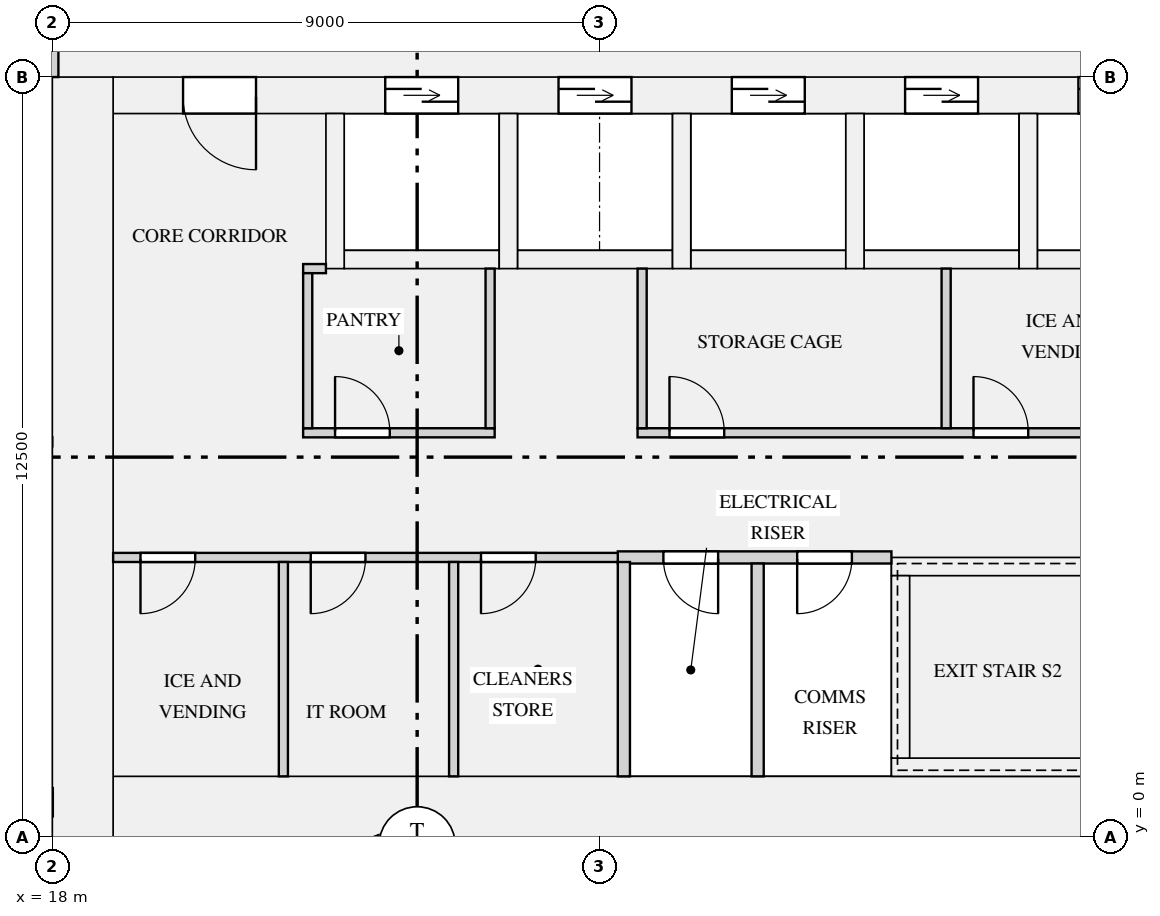
"""IFC4 building model, lengths in metres.
Left out: names, types, materials, properties, quantities, classifications, styles, units other than length and angle.
Written with IfcOpenShell. Run it as: python <this file> out.ifc"""

import sys

from ifc_helpers import new_model, si_unit, direction, frame, frame_2d, origin, place, context, subcontext, project, spatial, rectangle, extrude, element, fill, save


model = new_model("IFC4")
c1 = context("Model", 3, precision=1e-05, world=origin(), true_north=direction((0.0, 1.0)))
c2 = subcontext(c1, "Body", "Model", "MODEL_VIEW")
j1 = project(units=[si_unit("LENGTHUNIT", "METRE"), si_unit("PLANEANGLEUNIT", "RADIAN")], contexts=[c1])
p1 = place(None, origin())
s1 = spatial("IfcSite", under=j1, at=p1, CompositionType="ELEMENT")
p2 = place(p1, origin())
s2 = spatial("IfcBuilding", under=s1, at=p2, CompositionType="ELEMENT")
p3 = place(p2, frame((0.0, 0.0, 54.15)))
s3 = spatial("IfcBuildingStorey", under=s2, at=p3, CompositionType="ELEMENT", Elevation=54.15)
p4 = place(p3, frame((18.5, 0.0, 0.0), z_axis=(0.0, 0.0, 1.0), x_axis=(0.0, 1.0, 0.0)))
e1 = element("IfcWall", 1, at=p4, inside=s3, PredefinedType="SHEAR", context=c2, shape_type="SweptSolid", body=[
    extrude(rectangle(XDim=12.5, YDim=1.0, at=frame_2d((6.25, 0.0))), origin(), (0.0, 0.0, 1.0), 3.15),
])
p5 = place(p3, frame((19.0, 0.5, 0.0), z_axis=(0.0, 0.0, 1.0), x_axis=(1.0, 0.0, 0.0)))
e2 = element("IfcWall", 2, at=p5, inside=s3, PredefinedType="SHEAR", context=c2, shape_type="SweptSolid", body=[
    extrude(rectangle(XDim=34.0, YDim=1.0, at=frame_2d((17.0, 0.0))), origin(), (0.0, 0.0, 1.0), 3.15),
])
p6 = place(p3, frame((19.0, 12.2, 0.0), z_axis=(0.0, 0.0, 1.0), x_axis=(1.0, 0.0, 0.0)))
e3 = element("IfcWall", 3, at=p6, inside=s3, PredefinedType="SHEAR", context=c2, shape_type="SweptSolid", body=[
    extrude(rectangle(XDim=34.0, YDim=0.6, at=frame_2d((17.0, 0.0))), origin(), (0.0, 0.0, 1.0), 3.15),
])
p7 = place(p6, frame((4.475, 0.0, 0.0)))
e4 = element("IfcOpeningElement", 4, at=p7, cuts=e3, PredefinedType="OPENING", context=c2, shape_type="SweptSolid", body=[
    extrude(rectangle(XDim=1.2, YDim=2.1, at=frame_2d((0.6, 1.05))), frame((0.0, 0.31, 0.0), z_axis=(0.0, -1.0, 0.0), x_axis=(1.0, 0.0, 0.0)), (0.0, 0.0, 1.0), 0.62),
])
p8 = place(p6, frame((7.325, 0.0, 0.0)))
e5 = element("IfcOpeningElement", 5, at=p8, cuts=e3, PredefinedType="OPENING", context=c2, shape_type="SweptSolid", body=[
    extrude(rectangle(XDim=1.2, YDim=2.1, at=frame_2d((0.6, 1.05))), frame((0.0, 0.31, 0.0), z_axis=(0.0, -1.0, 0.0), x_axis=(1.0, 0.0, 0.0)), (0.0, 0.0, 1.0), 0.62),
])
p9 = place(p6, frame((10.175, 0.0, 0.0)))
e6 = element("IfcOpeningElement", 6, at=p9, cuts=e3, PredefinedType="OPENING", context=c2, shape_type="SweptSolid", body=[
    extrude(rectangle(XDim=1.2, YDim=2.1, at=frame_2d((0.6, 1.05))), frame((0.0, 0.31, 0.0), z_axis=(0.0, -1.0, 0.0), x_axis=(1.0, 0.0, 0.0)), (0.0, 0.0, 1.0), 0.62),
])
p10 = place(p6, frame((13.025, 0.0, 0.0)))
e7 = element("IfcOpeningElement", 7, at=p10, cuts=e3, PredefinedType="OPENING", context=c2, shape_type="SweptSolid", body=[
    extrude(rectangle(XDim=1.2, YDim=2.1, at=frame_2d((0.6, 1.05))), frame((0.0, 0.31, 0.0), z_axis=(0.0, -1.0, 0.0), x_axis=(1.0, 0.0, 0.0)), (0.0, 0.0, 1.0), 0.62),
])
p11 = place(p6, frame((15.875, 0.0, 0.0)))
e8 = element("IfcOpeningElement", 8, at=p11, cuts=e3, PredefinedType="OPENING", context=c2, shape_type="SweptSolid", body=[
    extrude(rectangle(XDim=1.2, YDim=2.1, at=frame_2d((0.6, 1.05))), frame((0.0, 0.31, 0.0), z_axis=(0.0, -1.0, 0.0), x_axis=(1.0, 0.0, 0.0)), (0.0, 0.0, 1.0), 0.62),
])
p12 = place(p6, frame((24.175, 0.0, 0.0)))
e9 = element("IfcOpeningElement", 9, at=p12, cuts=e3, PredefinedType="OPENING", context=c2, shape_type="SweptSolid", body=[
    extrude(rectangle(XDim=1.1, YDim=2.1, at=frame_2d((0.55, 1.05))), frame((0.0, 0.31, 0.0), z_axis=(0.0, -1.0, 0.0), x_axis=(1.0, 0.0, 0.0)), (0.0, 0.0, 1.0), 0.62),
])
p13 = place(p6, frame((26.425, 0.0, 0.0)))
e10 = element("IfcOpeningElement", 10, at=p13, cuts=e3, PredefinedType="OPENING", context=c2, shape_type="SweptSolid", body=[
    extrude(rectangle(XDim=1.1, YDim=2.1, at=frame_2d((0.55, 1.05))), frame((0.0, 0.31, 0.0), z_axis=(0.0, -1.0, 0.0), x_axis=(1.0, 0.0, 0.0)), (0.0, 0.0, 1.0), 0.62),
])
p14 = place(p6, frame((28.675, 0.0, 0.0)))
e11 = element("IfcOpeningElement", 11, at=p14, cuts=e3, PredefinedType="OPENING", context=c2, shape_type="SweptSolid", body=[
    extrude(rectangle(XDim=1.1, YDim=2.1, at=frame_2d((0.55, 1.05))), frame((0.0, 0.31, 0.0), z_axis=(0.0, -1.0, 0.0), x_axis=(1.0, 0.0, 0.0)), (0.0, 0.0, 1.0), 0.62),
])
p15 = place(p6, frame((1.15, 0.0, 0.0)))
e12 = element("IfcOpeningElement", 12, at=p15, cuts=e3, PredefinedType="OPENING", context=c2, shape_type="SweptSolid", body=[
    extrude(rectangle(XDim=1.2, YDim=2.1, at=frame_2d((0.6, 1.05))), frame((0.0, 0.31, 0.0), z_axis=(0.0, -1.0, 0.0), x_axis=(1.0, 0.0, 0.0)), (0.0, 0.0, 1.0), 0.62),
])
p16 = place(p6, frame((31.65, 0.0, 0.0)))
e13 = element("IfcOpeningElement", 13, at=p16, cuts=e3, PredefinedType="OPENING", context=c2, shape_type="SweptSolid", body=[
    extrude(rectangle(XDim=1.2, YDim=2.1, at=frame_2d((0.6, 1.05))), frame((0.0, 0.31, 0.0), z_axis=(0.0, -1.0, 0.0), x_axis=(1.0, 0.0, 0.0)), (0.0, 0.0, 1.0), 0.62),
])
p17 = place(p3, frame((22.8, 9.5, 0.0), z_axis=(0.0, 0.0, 1.0), x_axis=(1.0, 0.0, 0.0)))
e14 = element("IfcWall", 14, at=p17, inside=s3, PredefinedType="SHEAR", context=c2, shape_type="SweptSolid", body=[
    extrude(rectangle(XDim=2.55, YDim=0.3, at=frame_2d((1.275, 0.0))), origin(), (0.0, 0.0, 1.0), 3.15),
])
p18 = place(p3, frame((22.65, 9.35, 0.0), z_axis=(0.0, 0.0, 1.0), x_axis=(0.0, 1.0, 0.0)))
e15 = element("IfcWall", 15, at=p18, inside=s3, PredefinedType="SHEAR", context=c2, shape_type="SweptSolid", body=[
    extrude(rectangle(XDim=2.55, YDim=0.3, at=frame_2d((1.275, 0.0))), origin(), (0.0, 0.0, 1.0), 3.15),
])
p19 = place(p3, frame((25.65, 9.5, 0.0), z_axis=(0.0, 0.0, 1.0), x_axis=(1.0, 0.0, 0.0)))
e16 = element("IfcWall", 16, at=p19, inside=s3, PredefinedType="SHEAR", context=c2, shape_type="SweptSolid", body=[
    extrude(rectangle(XDim=2.55, YDim=0.3, at=frame_2d((1.275, 0.0))), origin(), (0.0, 0.0, 1.0), 3.15),
])
p20 = place(p3, frame((25.5, 9.35, 0.0), z_axis=(0.0, 0.0, 1.0), x_axis=(0.0, 1.0, 0.0)))
e17 = element("IfcWall", 17, at=p20, inside=s3, PredefinedType="SHEAR", context=c2, shape_type="SweptSolid", body=[
    extrude(rectangle(XDim=2.55, YDim=0.3, at=frame_2d((1.275, 0.0))), origin(), (0.0, 0.0, 1.0), 3.15),
])
p21 = place(p3, frame((28.5, 9.5, 0.0), z_axis=(0.0, 0.0, 1.0), x_axis=(1.0, 0.0, 0.0)))
e18 = element("IfcWall", 18, at=p21, inside=s3, PredefinedType="SHEAR", context=c2, shape_type="SweptSolid", body=[
    extrude(rectangle(XDim=2.55, YDim=0.3, at=frame_2d((1.275, 0.0))), origin(), (0.0, 0.0, 1.0), 3.15),
])
for number, where, z_axis, x_axis in (
    (19, (28.35, 9.35, 0.0), (0.0, 0.0, 1.0), (0.0, 1.0, 0.0)),
    (20, (31.35, 9.5, 0.0), (0.0, 0.0, 1.0), (1.0, 0.0, 0.0)),
    (21, (31.2, 9.35, 0.0), (0.0, 0.0, 1.0), (0.0, 1.0, 0.0)),
):
    element("IfcWall", number, at=place(p3, frame(where, z_axis=z_axis, x_axis=x_axis)), inside=s3, PredefinedType="SHEAR", context=c2, shape_type="SweptSolid", body=[
        extrude(rectangle(XDim=2.55, YDim=0.3, at=frame_2d((1.275, 0.0))), origin(), (0.0, 0.0, 1.0), 3.15),
    ])
p22 = place(p3, frame((34.2, 9.5, 0.0), z_axis=(0.0, 0.0, 1.0), x_axis=(1.0, 0.0, 0.0)))
e22 = element("IfcWall", 22, at=p22, inside=s3, PredefinedType="SHEAR", context=c2, shape_type="SweptSolid", body=[
    extrude(rectangle(XDim=2.55, YDim=0.3, at=frame_2d((1.275, 0.0))), origin(), (0.0, 0.0, 1.0), 3.15),
])
p23 = place(p3, frame((34.05, 9.35, 0.0), z_axis=(0.0, 0.0, 1.0), x_axis=(0.0, 1.0, 0.0)))
e23 = element("IfcWall", 23, at=p23, inside=s3, PredefinedType="SHEAR", context=c2, shape_type="SweptSolid", body=[
    extrude(rectangle(XDim=2.55, YDim=0.3, at=frame_2d((1.275, 0.0))), origin(), (0.0, 0.0, 1.0), 3.15),
])
p24 = place(p3, frame((31.8, 1.15, 0.0), z_axis=(0.0, 0.0, 1.0), x_axis=(1.0, 0.0, 0.0)))
e24 = element("IfcWall", 24, at=p24, inside=s3, PredefinedType="SHEAR", context=c2, shape_type="SweptSolid", body=[
    extrude(rectangle(XDim=8.4, YDim=0.3, at=frame_2d((4.2, 0.0))), origin(), (0.0, 0.0, 1.0), 3.15),
])
p25 = place(p3, frame((31.8, 4.45, 0.0), z_axis=(0.0, 0.0, 1.0), x_axis=(1.0, 0.0, 0.0)))
e25 = element("IfcWall", 25, at=p25, inside=s3, PredefinedType="SHEAR", context=c2, shape_type="SweptSolid", body=[
    extrude(rectangle(XDim=8.4, YDim=0.3, at=frame_2d((4.2, 0.0))), origin(), (0.0, 0.0, 1.0), 3.15),
])
p26 = place(p25, frame((6.8, 0.0, 0.0)))
e26 = element("IfcOpeningElement", 26, at=p26, cuts=e25, PredefinedType="OPENING", context=c2, shape_type="SweptSolid", body=[
    extrude(rectangle(XDim=1.1, YDim=2.1, at=frame_2d((0.55, 1.05))), frame((0.0, 0.16, 0.0), z_axis=(0.0, -1.0, 0.0), x_axis=(1.0, 0.0, 0.0)), (0.0, 0.0, 1.0), 0.32),
])
p27 = place(p3, frame((31.95, 1.3, 0.0), z_axis=(0.0, 0.0, 1.0), x_axis=(0.0, 1.0, 0.0)))
e27 = element("IfcWall", 27, at=p27, inside=s3, PredefinedType="SHEAR", context=c2, shape_type="SweptSolid", body=[
    extrude(rectangle(XDim=3.0, YDim=0.3, at=frame_2d((1.5, 0.0))), origin(), (0.0, 0.0, 1.0), 3.15),
])
p28 = place(p3, frame((27.3, 4.6, 0.0), z_axis=(0.0, 0.0, 1.0), x_axis=(1.0, 0.0, 0.0)))
e28 = element("IfcWall", 28, at=p28, inside=s3, PredefinedType="PARTITIONING", context=c2, shape_type="SweptSolid", body=[
    extrude(rectangle(XDim=4.5, YDim=0.2, at=frame_2d((2.25, 0.0))), origin(), (0.0, 0.0, 1.0), 2.83),
])
p29 = place(p28, frame((0.75, 0.0, 0.0)))
e29 = element("IfcOpeningElement", 29, at=p29, cuts=e28, PredefinedType="OPENING", context=c2, shape_type="SweptSolid", body=[
    extrude(rectangle(XDim=0.9, YDim=2.1, at=frame_2d((0.45, 1.05))), frame((0.0, 0.11, 0.0), z_axis=(0.0, -1.0, 0.0), x_axis=(1.0, 0.0, 0.0)), (0.0, 0.0, 1.0), 0.22),
])
p30 = place(p28, frame((2.95, 0.0, 0.0)))
e30 = element("IfcOpeningElement", 30, at=p30, cuts=e28, PredefinedType="OPENING", context=c2, shape_type="SweptSolid", body=[
    extrude(rectangle(XDim=0.9, YDim=2.1, at=frame_2d((0.45, 1.05))), frame((0.0, 0.11, 0.0), z_axis=(0.0, -1.0, 0.0), x_axis=(1.0, 0.0, 0.0)), (0.0, 0.0, 1.0), 0.22),
])
p31 = place(p3, frame((19.0, 4.6, 0.0), z_axis=(0.0, 0.0, 1.0), x_axis=(1.0, 0.0, 0.0)))
e31 = element("IfcWall", 31, at=p31, inside=s3, PredefinedType="PARTITIONING", context=c2, shape_type="SweptSolid", body=[
    extrude(rectangle(XDim=8.3, YDim=0.15, at=frame_2d((4.15, 0.0))), origin(), (0.0, 0.0, 1.0), 2.83),
])
p32 = place(p31, frame((0.45, 0.0, 0.0)))
e32 = element("IfcOpeningElement", 32, at=p32, cuts=e31, PredefinedType="OPENING", context=c2, shape_type="SweptSolid", body=[
    extrude(rectangle(XDim=0.9, YDim=2.1, at=frame_2d((0.45, 1.05))), frame((0.0, 0.085, 0.0), z_axis=(0.0, -1.0, 0.0), x_axis=(1.0, 0.0, 0.0)), (0.0, 0.0, 1.0), 0.17),
])
p33 = place(p31, frame((3.25, 0.0, 0.0)))
e33 = element("IfcOpeningElement", 33, at=p33, cuts=e31, PredefinedType="OPENING", context=c2, shape_type="SweptSolid", body=[
    extrude(rectangle(XDim=0.9, YDim=2.1, at=frame_2d((0.45, 1.05))), frame((0.0, 0.085, 0.0), z_axis=(0.0, -1.0, 0.0), x_axis=(1.0, 0.0, 0.0)), (0.0, 0.0, 1.0), 0.17),
])
p34 = place(p31, frame((6.05, 0.0, 0.0)))
e34 = element("IfcOpeningElement", 34, at=p34, cuts=e31, PredefinedType="OPENING", context=c2, shape_type="SweptSolid", body=[
    extrude(rectangle(XDim=0.9, YDim=2.1, at=frame_2d((0.45, 1.05))), frame((0.0, 0.085, 0.0), z_axis=(0.0, -1.0, 0.0), x_axis=(1.0, 0.0, 0.0)), (0.0, 0.0, 1.0), 0.17),
])
p35 = place(p3, frame((22.125, 6.65, 0.0), z_axis=(0.0, 0.0, 1.0), x_axis=(1.0, 0.0, 0.0)))
e35 = element("IfcWall", 35, at=p35, inside=s3, PredefinedType="PARTITIONING", context=c2, shape_type="SweptSolid", body=[
    extrude(rectangle(XDim=3.15, YDim=0.15, at=frame_2d((1.575, 0.0))), origin(), (0.0, 0.0, 1.0), 2.83),
])
p36 = place(p35, frame((0.525, 0.0, 0.0)))
e36 = element("IfcOpeningElement", 36, at=p36, cuts=e35, PredefinedType="OPENING", context=c2, shape_type="SweptSolid", body=[
    extrude(rectangle(XDim=0.9, YDim=2.1, at=frame_2d((0.45, 1.05))), frame((0.0, 0.085, 0.0), z_axis=(0.0, -1.0, 0.0), x_axis=(1.0, 0.0, 0.0)), (0.0, 0.0, 1.0), 0.17),
])
p37 = place(p3, frame((27.625, 6.65, 0.0), z_axis=(0.0, 0.0, 1.0), x_axis=(1.0, 0.0, 0.0)))
e37 = element("IfcWall", 37, at=p37, inside=s3, PredefinedType="PARTITIONING", context=c2, shape_type="SweptSolid", body=[
    extrude(rectangle(XDim=8.65, YDim=0.15, at=frame_2d((4.325, 0.0))), origin(), (0.0, 0.0, 1.0), 2.83),
])
p38 = place(p37, frame((0.525, 0.0, 0.0)))
e38 = element("IfcOpeningElement", 38, at=p38, cuts=e37, PredefinedType="OPENING", context=c2, shape_type="SweptSolid", body=[
    extrude(rectangle(XDim=0.9, YDim=2.1, at=frame_2d((0.45, 1.05))), frame((0.0, 0.085, 0.0), z_axis=(0.0, -1.0, 0.0), x_axis=(1.0, 0.0, 0.0)), (0.0, 0.0, 1.0), 0.17),
])
p39 = place(p37, frame((5.525, 0.0, 0.0)))
e39 = element("IfcOpeningElement", 39, at=p39, cuts=e37, PredefinedType="OPENING", context=c2, shape_type="SweptSolid", body=[
    extrude(rectangle(XDim=0.9, YDim=2.1, at=frame_2d((0.45, 1.05))), frame((0.0, 0.085, 0.0), z_axis=(0.0, -1.0, 0.0), x_axis=(1.0, 0.0, 0.0)), (0.0, 0.0, 1.0), 0.17),
])
p40 = place(p3, frame((22.125, 9.35, 0.0), z_axis=(0.0, 0.0, 1.0), x_axis=(1.0, 0.0, 0.0)))
e40 = element("IfcWall", 40, at=p40, inside=s3, PredefinedType="PARTITIONING", context=c2, shape_type="SweptSolid", body=[
    extrude(rectangle(XDim=0.375, YDim=0.15, at=frame_2d((0.188, 0.0))), origin(), (0.0, 0.0, 1.0), 2.83),
])
for number, where, z_axis, x_axis in (
    (41, (21.8, 1.0, 0.0), (0.0, 0.0, 1.0), (0.0, 1.0, 0.0)),
    (42, (24.6, 1.0, 0.0), (0.0, 0.0, 1.0), (0.0, 1.0, 0.0)),
):
    element("IfcWall", number, at=place(p3, frame(where, z_axis=z_axis, x_axis=x_axis)), inside=s3, PredefinedType="PARTITIONING", context=c2, shape_type="SweptSolid", body=[
        extrude(rectangle(XDim=3.525, YDim=0.15, at=frame_2d((1.762, 0.0))), origin(), (0.0, 0.0, 1.0), 2.83),
    ])
p41 = place(p3, frame((27.4, 1.0, 0.0), z_axis=(0.0, 0.0, 1.0), x_axis=(0.0, 1.0, 0.0)))
e43 = element("IfcWall", 43, at=p41, inside=s3, PredefinedType="PARTITIONING", context=c2, shape_type="SweptSolid", body=[
    extrude(rectangle(XDim=3.525, YDim=0.2, at=frame_2d((1.762, 0.0))), origin(), (0.0, 0.0, 1.0), 2.83),
])
p42 = place(p3, frame((29.6, 1.0, 0.0), z_axis=(0.0, 0.0, 1.0), x_axis=(0.0, 1.0, 0.0)))
e44 = element("IfcWall", 44, at=p42, inside=s3, PredefinedType="PARTITIONING", context=c2, shape_type="SweptSolid", body=[
    extrude(rectangle(XDim=3.5, YDim=0.2, at=frame_2d((1.75, 0.0))), origin(), (0.0, 0.0, 1.0), 2.83),
])
p43 = place(p3, frame((22.2, 6.725, 0.0), z_axis=(0.0, 0.0, 1.0), x_axis=(0.0, 1.0, 0.0)))
e45 = element("IfcWall", 45, at=p43, inside=s3, PredefinedType="PARTITIONING", context=c2, shape_type="SweptSolid", body=[
    extrude(rectangle(XDim=2.55, YDim=0.15, at=frame_2d((1.275, 0.0))), origin(), (0.0, 0.0, 1.0), 2.83),
])
for number, where, z_axis, x_axis in (
    (46, (25.2, 6.725, 0.0), (0.0, 0.0, 1.0), (0.0, 1.0, 0.0)),
    (47, (27.7, 6.725, 0.0), (0.0, 0.0, 1.0), (0.0, 1.0, 0.0)),
    (48, (32.7, 6.725, 0.0), (0.0, 0.0, 1.0), (0.0, 1.0, 0.0)),
):
    element("IfcWall", number, at=place(p3, frame(where, z_axis=z_axis, x_axis=x_axis)), inside=s3, PredefinedType="PARTITIONING", context=c2, shape_type="SweptSolid", body=[
        extrude(rectangle(XDim=2.625, YDim=0.15, at=frame_2d((1.312, 0.0))), origin(), (0.0, 0.0, 1.0), 2.83),
    ])
p44 = place(p3, frame((18.0, 12.5, 0.0), z_axis=(0.0, 0.0, 1.0), x_axis=(0.0, 1.0, 0.0)))
e49 = element("IfcWall", 49, at=p44, inside=s3, PredefinedType="PARTITIONING", context=c2, shape_type="SweptSolid", body=[
    extrude(rectangle(XDim=3.4, YDim=0.2, at=frame_2d((1.7, 0.0))), origin(), (0.0, 0.0, 1.0), 2.83),
])
p45 = place(p7, origin())
e50 = element("IfcDoor", 50, at=p45, inside=s3, OperationType="DOUBLE_DOOR_SLIDING", PredefinedType="DOOR", context=c2, shape_type="SweptSolid", body=[
    extrude(rectangle(XDim=1.2, YDim=2.1, at=frame_2d((0.6, 1.05))), frame((0.0, 0.025, 0.0), z_axis=(0.0, -1.0, 0.0), x_axis=(1.0, 0.0, 0.0)), (0.0, 0.0, 1.0), 0.05),
])
fill(e4, e50)
p46 = place(p8, origin())
e51 = element("IfcDoor", 51, at=p46, inside=s3, OperationType="DOUBLE_DOOR_SLIDING", PredefinedType="DOOR", context=c2, shape_type="SweptSolid", body=[
    extrude(rectangle(XDim=1.2, YDim=2.1, at=frame_2d((0.6, 1.05))), frame((0.0, 0.025, 0.0), z_axis=(0.0, -1.0, 0.0), x_axis=(1.0, 0.0, 0.0)), (0.0, 0.0, 1.0), 0.05),
])
fill(e5, e51)
p47 = place(p9, origin())
e52 = element("IfcDoor", 52, at=p47, inside=s3, OperationType="DOUBLE_DOOR_SLIDING", PredefinedType="DOOR", context=c2, shape_type="SweptSolid", body=[
    extrude(rectangle(XDim=1.2, YDim=2.1, at=frame_2d((0.6, 1.05))), frame((0.0, 0.025, 0.0), z_axis=(0.0, -1.0, 0.0), x_axis=(1.0, 0.0, 0.0)), (0.0, 0.0, 1.0), 0.05),
])
fill(e6, e52)
p48 = place(p10, origin())
e53 = element("IfcDoor", 53, at=p48, inside=s3, OperationType="DOUBLE_DOOR_SLIDING", PredefinedType="DOOR", context=c2, shape_type="SweptSolid", body=[
    extrude(rectangle(XDim=1.2, YDim=2.1, at=frame_2d((0.6, 1.05))), frame((0.0, 0.025, 0.0), z_axis=(0.0, -1.0, 0.0), x_axis=(1.0, 0.0, 0.0)), (0.0, 0.0, 1.0), 0.05),
])
fill(e7, e53)
p49 = place(p11, origin())
e54 = element("IfcDoor", 54, at=p49, inside=s3, OperationType="DOUBLE_DOOR_SLIDING", PredefinedType="DOOR", context=c2, shape_type="SweptSolid", body=[
    extrude(rectangle(XDim=1.2, YDim=2.1, at=frame_2d((0.6, 1.05))), frame((0.0, 0.025, 0.0), z_axis=(0.0, -1.0, 0.0), x_axis=(1.0, 0.0, 0.0)), (0.0, 0.0, 1.0), 0.05),
])
fill(e8, e54)
p50 = place(p36, origin())
e55 = element("IfcDoor", 55, at=p50, inside=s3, OperationType="SINGLE_SWING_LEFT", PredefinedType="DOOR", context=c2, shape_type="SweptSolid", body=[
    extrude(rectangle(XDim=0.9, YDim=2.1, at=frame_2d((0.45, 1.05))), frame((0.0, 0.025, 0.0), z_axis=(0.0, -1.0, 0.0), x_axis=(1.0, 0.0, 0.0)), (0.0, 0.0, 1.0), 0.05),
])
fill(e36, e55)
p51 = place(p38, origin())
e56 = element("IfcDoor", 56, at=p51, inside=s3, OperationType="SINGLE_SWING_LEFT", PredefinedType="DOOR", context=c2, shape_type="SweptSolid", body=[
    extrude(rectangle(XDim=0.9, YDim=2.1, at=frame_2d((0.45, 1.05))), frame((0.0, 0.025, 0.0), z_axis=(0.0, -1.0, 0.0), x_axis=(1.0, 0.0, 0.0)), (0.0, 0.0, 1.0), 0.05),
])
fill(e38, e56)
p52 = place(p39, origin())
e57 = element("IfcDoor", 57, at=p52, inside=s3, OperationType="SINGLE_SWING_LEFT", PredefinedType="DOOR", context=c2, shape_type="SweptSolid", body=[
    extrude(rectangle(XDim=0.9, YDim=2.1, at=frame_2d((0.45, 1.05))), frame((0.0, 0.025, 0.0), z_axis=(0.0, -1.0, 0.0), x_axis=(1.0, 0.0, 0.0)), (0.0, 0.0, 1.0), 0.05),
])
fill(e39, e57)
p53 = place(p32, frame((0.9, 0.0, 0.0), z_axis=(0.0, 0.0, 1.0), x_axis=(-1.0, 0.0, 0.0)))
e58 = element("IfcDoor", 58, at=p53, inside=s3, OperationType="SINGLE_SWING_RIGHT", PredefinedType="DOOR", context=c2, shape_type="SweptSolid", body=[
    extrude(rectangle(XDim=0.9, YDim=2.1, at=frame_2d((0.45, 1.05))), frame((0.0, 0.025, 0.0), z_axis=(0.0, -1.0, 0.0), x_axis=(1.0, 0.0, 0.0)), (0.0, 0.0, 1.0), 0.05),
])
fill(e32, e58)
p54 = place(p33, frame((0.9, 0.0, 0.0), z_axis=(0.0, 0.0, 1.0), x_axis=(-1.0, 0.0, 0.0)))
e59 = element("IfcDoor", 59, at=p54, inside=s3, OperationType="SINGLE_SWING_RIGHT", PredefinedType="DOOR", context=c2, shape_type="SweptSolid", body=[
    extrude(rectangle(XDim=0.9, YDim=2.1, at=frame_2d((0.45, 1.05))), frame((0.0, 0.025, 0.0), z_axis=(0.0, -1.0, 0.0), x_axis=(1.0, 0.0, 0.0)), (0.0, 0.0, 1.0), 0.05),
])
fill(e33, e59)
p55 = place(p34, frame((0.9, 0.0, 0.0), z_axis=(0.0, 0.0, 1.0), x_axis=(-1.0, 0.0, 0.0)))
e60 = element("IfcDoor", 60, at=p55, inside=s3, OperationType="SINGLE_SWING_RIGHT", PredefinedType="DOOR", context=c2, shape_type="SweptSolid", body=[
    extrude(rectangle(XDim=0.9, YDim=2.1, at=frame_2d((0.45, 1.05))), frame((0.0, 0.025, 0.0), z_axis=(0.0, -1.0, 0.0), x_axis=(1.0, 0.0, 0.0)), (0.0, 0.0, 1.0), 0.05),
])
fill(e34, e60)
p56 = place(p29, frame((0.9, 0.0, 0.0), z_axis=(0.0, 0.0, 1.0), x_axis=(-1.0, 0.0, 0.0)))
e61 = element("IfcDoor", 61, at=p56, inside=s3, OperationType="SINGLE_SWING_LEFT", PredefinedType="DOOR", context=c2, shape_type="SweptSolid", body=[
    extrude(rectangle(XDim=0.9, YDim=2.1, at=frame_2d((0.45, 1.05))), frame((0.0, 0.025, 0.0), z_axis=(0.0, -1.0, 0.0), x_axis=(1.0, 0.0, 0.0)), (0.0, 0.0, 1.0), 0.05),
])
fill(e29, e61)
p57 = place(p30, frame((0.9, 0.0, 0.0), z_axis=(0.0, 0.0, 1.0), x_axis=(-1.0, 0.0, 0.0)))
e62 = element("IfcDoor", 62, at=p57, inside=s3, OperationType="SINGLE_SWING_RIGHT", PredefinedType="DOOR", context=c2, shape_type="SweptSolid", body=[
    extrude(rectangle(XDim=0.9, YDim=2.1, at=frame_2d((0.45, 1.05))), frame((0.0, 0.025, 0.0), z_axis=(0.0, -1.0, 0.0), x_axis=(1.0, 0.0, 0.0)), (0.0, 0.0, 1.0), 0.05),
])
fill(e30, e62)
p58 = place(p15, frame((1.2, 0.0, 0.0), z_axis=(0.0, 0.0, 1.0), x_axis=(-1.0, 0.0, 0.0)))
e63 = element("IfcDoor", 63, at=p58, inside=s3, OperationType="SINGLE_SWING_LEFT", PredefinedType="DOOR", context=c2, shape_type="SweptSolid", body=[
    extrude(rectangle(XDim=1.2, YDim=2.1, at=frame_2d((0.6, 1.05))), frame((0.0, 0.025, 0.0), z_axis=(0.0, -1.0, 0.0), x_axis=(1.0, 0.0, 0.0)), (0.0, 0.0, 1.0), 0.05),
])
fill(e12, e63)
save(model, sys.argv[1])
